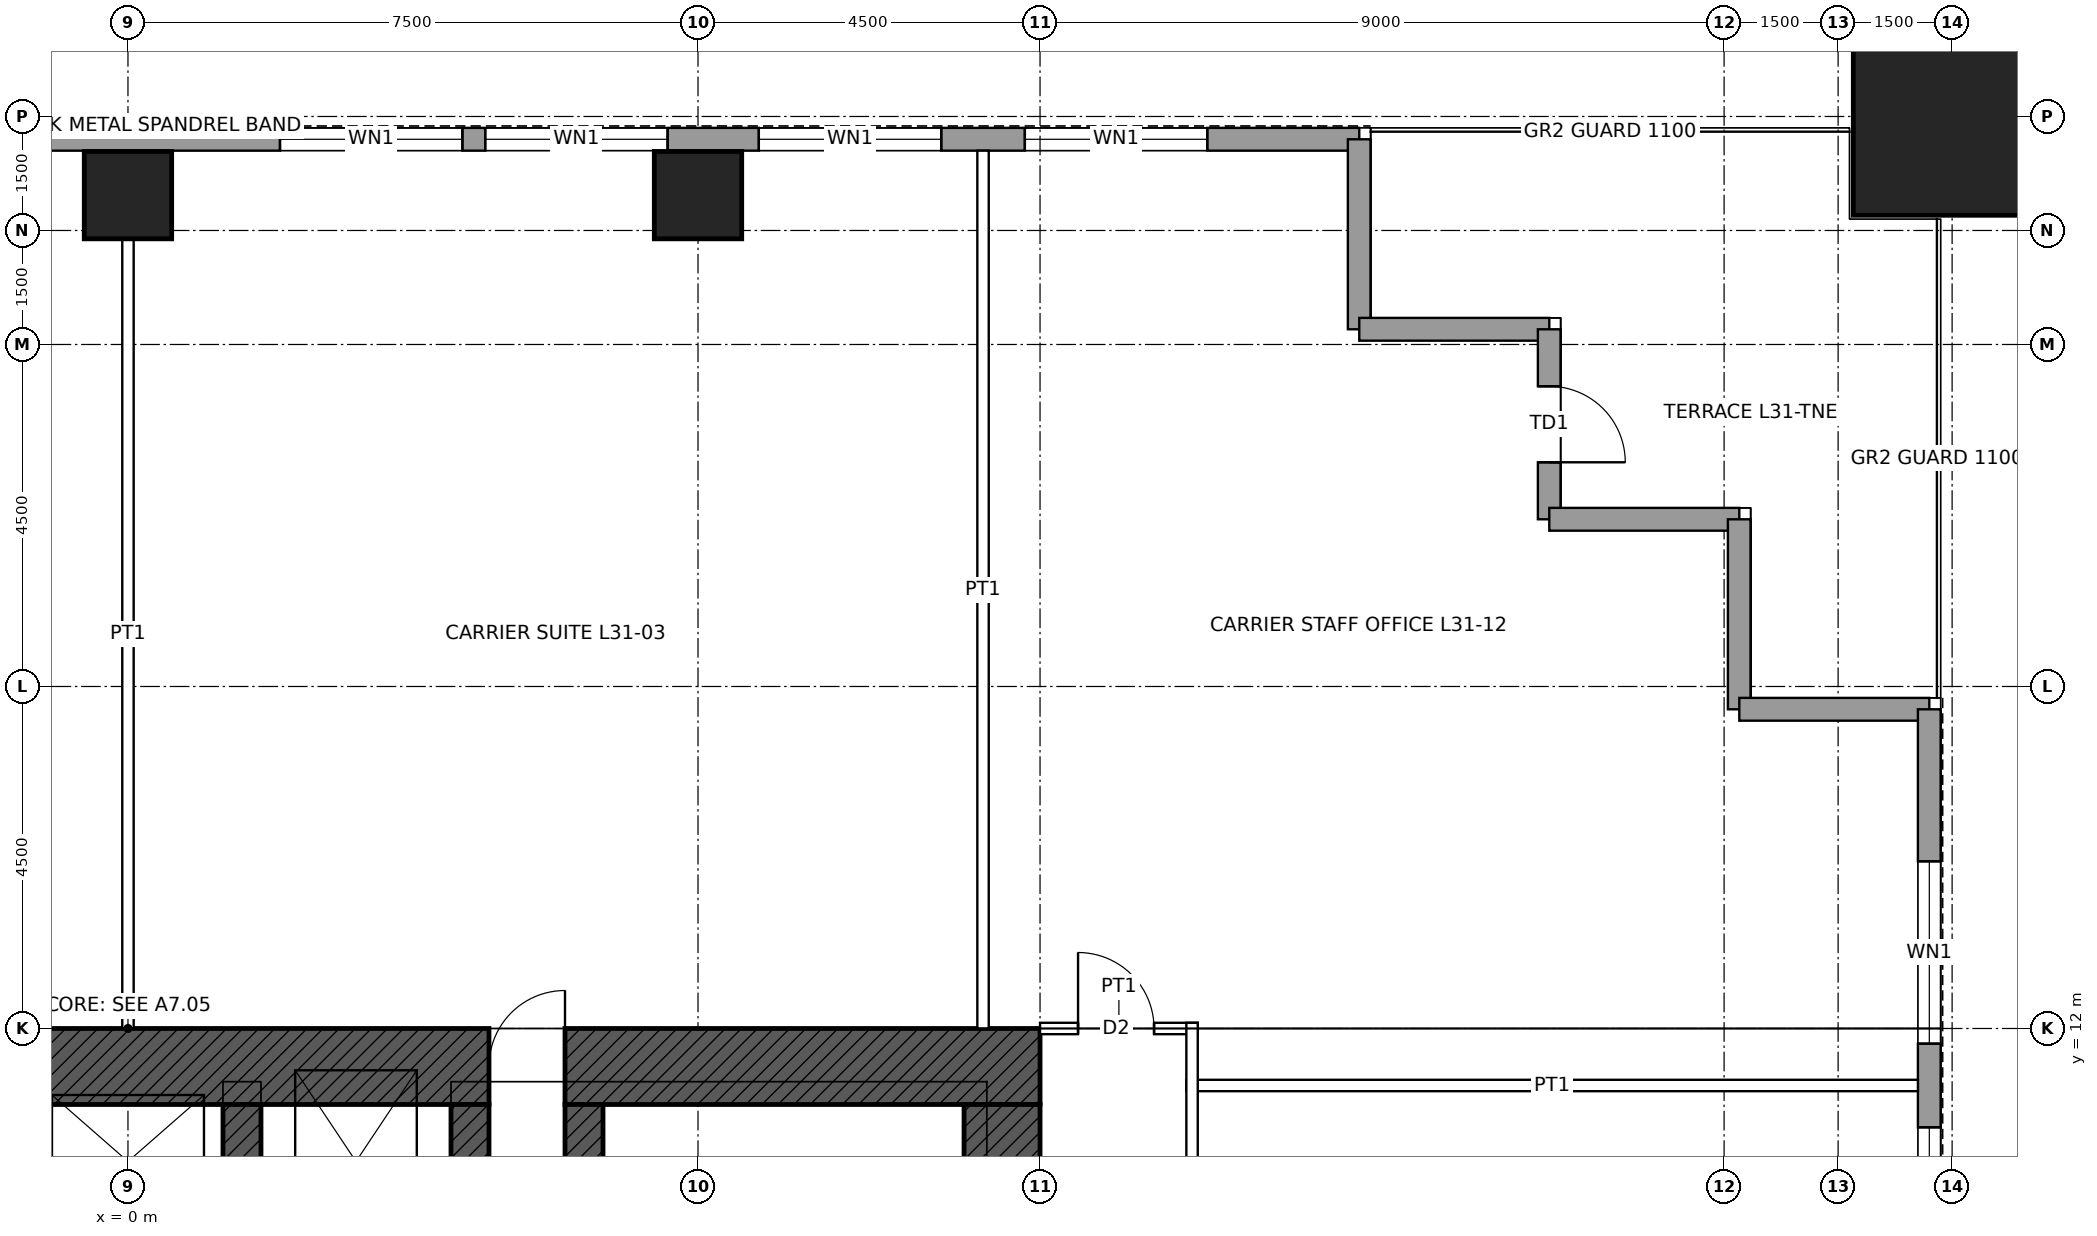
"""IFC4 building model, lengths in metres.
Left out: names, types, materials, properties, quantities, classifications, styles, units other than length and angle.
Written with IfcOpenShell. Run it as: python <this file> out.ifc"""

import sys

from ifc_helpers import new_model, si_unit, direction, frame, frame_2d, origin, origin_2d, place, context, subcontext, project, spatial, rectangle, hollow_rectangle, extrude, element, fill, save


model = new_model("IFC4")
c1 = context("Model", 3, precision=1e-05, world=origin(), true_north=direction((0.0, 1.0)))
c2 = subcontext(c1, "Body", "Model", "MODEL_VIEW")
j1 = project(units=[si_unit("LENGTHUNIT", "METRE"), si_unit("PLANEANGLEUNIT", "RADIAN")], contexts=[c1])
p1 = place(None, origin())
s1 = spatial("IfcSite", under=j1, at=p1, CompositionType="ELEMENT")
p2 = place(p1, origin())
s2 = spatial("IfcBuilding", under=s1, at=p2, CompositionType="ELEMENT")
p3 = place(p2, frame((0.0, 0.0, 153.9)))
s3 = spatial("IfcBuildingStorey", under=s2, at=p3, CompositionType="ELEMENT", Elevation=153.9)
p4 = place(p3, frame((24.0, 24.0, 0.0), z_axis=(0.0, 0.0, 1.0), x_axis=(1.0, 0.0, 0.0)))
e1 = element("IfcColumn", 1, at=p4, inside=s3, PredefinedType="COLUMN", context=c2, shape_type="SweptSolid", body=[
    extrude(hollow_rectangle(XDim=2.6, YDim=2.6, WallThickness=0.13, at=origin_2d()), origin(), (0.0, 0.0, 1.0), 4.5),
])
for number, where, z_axis, x_axis in (
    (2, (0.0, 22.965, 0.0), (0.0, 0.0, 1.0), (1.0, 0.0, 0.0)),
    (3, (7.5, 22.965, 0.0), (0.0, 0.0, 1.0), (1.0, 0.0, 0.0)),
):
    element("IfcColumn", number, at=place(p3, frame(where, z_axis=z_axis, x_axis=x_axis)), inside=s3, PredefinedType="COLUMN", context=c2, shape_type="SweptSolid", body=[
        extrude(hollow_rectangle(XDim=1.15, YDim=1.15, WallThickness=0.075, at=origin_2d()), origin(), (0.0, 0.0, 1.0), 4.5),
    ])
p5 = place(p3, frame((-12.0, 11.5, 0.0), z_axis=(0.0, 0.0, 1.0), x_axis=(1.0, 0.0, 0.0)))
e4 = element("IfcWall", 4, at=p5, inside=s3, PredefinedType="SHEAR", context=c2, shape_type="SweptSolid", body=[
    extrude(rectangle(XDim=24.0, YDim=1.0, at=frame_2d((12.0, 0.0))), origin(), (0.0, 0.0, 1.0), 4.5),
])
p6 = place(p5, frame((6.25, 0.0, 0.0)))
e5 = element("IfcOpeningElement", 5, at=p6, cuts=e4, PredefinedType="OPENING", context=c2, shape_type="SweptSolid", body=[
    extrude(rectangle(XDim=1.0, YDim=2.4, at=frame_2d((0.5, 1.2))), frame((0.0, 0.51, 0.0), z_axis=(0.0, -1.0, 0.0), x_axis=(1.0, 0.0, 0.0)), (0.0, 0.0, 1.0), 1.02),
])
p7 = place(p5, frame((16.75, 0.0, 0.0)))
e6 = element("IfcOpeningElement", 6, at=p7, cuts=e4, PredefinedType="OPENING", context=c2, shape_type="SweptSolid", body=[
    extrude(rectangle(XDim=1.0, YDim=2.4, at=frame_2d((0.5, 1.2))), frame((0.0, 0.51, 0.0), z_axis=(0.0, -1.0, 0.0), x_axis=(1.0, 0.0, 0.0)), (0.0, 0.0, 1.0), 1.02),
])
p8 = place(p3, frame((11.5, 11.0, 0.0), z_axis=(0.0, 0.0, 1.0), x_axis=(0.0, -1.0, 0.0)))
e7 = element("IfcWall", 7, at=p8, inside=s3, PredefinedType="SHEAR", context=c2, shape_type="SweptSolid", body=[
    extrude(rectangle(XDim=22.0, YDim=1.0, at=frame_2d((11.0, 0.0))), origin(), (0.0, 0.0, 1.0), 4.5),
])
p9 = place(p8, frame((10.5, 0.0, 0.0)))
e8 = element("IfcOpeningElement", 8, at=p9, cuts=e7, PredefinedType="OPENING", context=c2, shape_type="SweptSolid", body=[
    extrude(rectangle(XDim=1.0, YDim=2.4, at=frame_2d((0.5, 1.2))), frame((0.0, 0.51, 0.0), z_axis=(0.0, -1.0, 0.0), x_axis=(1.0, 0.0, 0.0)), (0.0, 0.0, 1.0), 1.02),
])
p10 = place(p3, frame((6.0, 4.5, 0.0), z_axis=(0.0, 0.0, 1.0), x_axis=(0.0, 1.0, 0.0)))
e9 = element("IfcWall", 9, at=p10, inside=s3, PredefinedType="SHEAR", context=c2, shape_type="SweptSolid", body=[
    extrude(rectangle(XDim=6.5, YDim=0.5, at=frame_2d((3.25, 0.0))), origin(), (0.0, 0.0, 1.0), 4.5),
])
p11 = place(p10, frame((0.6, 0.0, 0.0)))
e10 = element("IfcOpeningElement", 10, at=p11, cuts=e9, PredefinedType="OPENING", context=c2, shape_type="SweptSolid", body=[
    extrude(rectangle(XDim=1.0, YDim=2.1, at=frame_2d((0.5, 1.05))), frame((0.0, 0.26, 0.0), z_axis=(0.0, -1.0, 0.0), x_axis=(1.0, 0.0, 0.0)), (0.0, 0.0, 1.0), 0.52),
])
for number, where, z_axis, x_axis in (
    (11, (4.5, 8.5, 0.0), (0.0, 0.0, 1.0), (0.0, 1.0, 0.0)),
    (12, (1.5, 8.5, 0.0), (0.0, 0.0, 1.0), (0.0, 1.0, 0.0)),
):
    element("IfcWall", number, at=place(p3, frame(where, z_axis=z_axis, x_axis=x_axis)), inside=s3, PredefinedType="SHEAR", context=c2, shape_type="SweptSolid", body=[
        extrude(rectangle(XDim=2.5, YDim=0.5, at=frame_2d((1.25, 0.0))), origin(), (0.0, 0.0, 1.0), 4.5),
    ])
p12 = place(p3, frame((-16.2, 23.7, 0.0), z_axis=(0.0, 0.0, 1.0), x_axis=(1.0, 0.0, 0.0)))
e13 = element("IfcWall", 13, at=p12, inside=s3, PredefinedType="SOLIDWALL", context=c2, shape_type="SweptSolid", body=[
    extrude(rectangle(XDim=32.4, YDim=0.3, at=frame_2d((16.2, 0.0))), origin(), (0.0, 0.0, 1.0), 4.3),
])
p13 = place(p12, frame((2.0, 0.0, 1.0)))
e14 = element("IfcOpeningElement", 14, at=p13, cuts=e13, PredefinedType="OPENING", context=c2, shape_type="SweptSolid", body=[
    extrude(rectangle(XDim=2.4, YDim=1.2, at=frame_2d((1.2, 0.6))), frame((0.0, 0.16, 0.0), z_axis=(0.0, -1.0, 0.0), x_axis=(1.0, 0.0, 0.0)), (0.0, 0.0, 1.0), 0.32),
])
p14 = place(p12, frame((5.5, 0.0, 1.0)))
e15 = element("IfcOpeningElement", 15, at=p14, cuts=e13, PredefinedType="OPENING", context=c2, shape_type="SweptSolid", body=[
    extrude(rectangle(XDim=2.4, YDim=1.2, at=frame_2d((1.2, 0.6))), frame((0.0, 0.16, 0.0), z_axis=(0.0, -1.0, 0.0), x_axis=(1.0, 0.0, 0.0)), (0.0, 0.0, 1.0), 0.32),
])
p15 = place(p12, frame((9.1, 0.0, 1.0)))
e16 = element("IfcOpeningElement", 16, at=p15, cuts=e13, PredefinedType="OPENING", context=c2, shape_type="SweptSolid", body=[
    extrude(rectangle(XDim=2.4, YDim=1.2, at=frame_2d((1.2, 0.6))), frame((0.0, 0.16, 0.0), z_axis=(0.0, -1.0, 0.0), x_axis=(1.0, 0.0, 0.0)), (0.0, 0.0, 1.0), 0.32),
])
p16 = place(p12, frame((11.8, 0.0, 1.0)))
e17 = element("IfcOpeningElement", 17, at=p16, cuts=e13, PredefinedType="OPENING", context=c2, shape_type="SweptSolid", body=[
    extrude(rectangle(XDim=2.4, YDim=1.2, at=frame_2d((1.2, 0.6))), frame((0.0, 0.16, 0.0), z_axis=(0.0, -1.0, 0.0), x_axis=(1.0, 0.0, 0.0)), (0.0, 0.0, 1.0), 0.32),
])
p17 = place(p12, frame((18.2, 0.0, 1.0)))
e18 = element("IfcOpeningElement", 18, at=p17, cuts=e13, PredefinedType="OPENING", context=c2, shape_type="SweptSolid", body=[
    extrude(rectangle(XDim=2.4, YDim=1.2, at=frame_2d((1.2, 0.6))), frame((0.0, 0.16, 0.0), z_axis=(0.0, -1.0, 0.0), x_axis=(1.0, 0.0, 0.0)), (0.0, 0.0, 1.0), 0.32),
])
p18 = place(p12, frame((20.9, 0.0, 1.0)))
e19 = element("IfcOpeningElement", 19, at=p18, cuts=e13, PredefinedType="OPENING", context=c2, shape_type="SweptSolid", body=[
    extrude(rectangle(XDim=2.4, YDim=1.2, at=frame_2d((1.2, 0.6))), frame((0.0, 0.16, 0.0), z_axis=(0.0, -1.0, 0.0), x_axis=(1.0, 0.0, 0.0)), (0.0, 0.0, 1.0), 0.32),
])
p19 = place(p12, frame((24.5, 0.0, 1.0)))
e20 = element("IfcOpeningElement", 20, at=p19, cuts=e13, PredefinedType="OPENING", context=c2, shape_type="SweptSolid", body=[
    extrude(rectangle(XDim=2.4, YDim=1.2, at=frame_2d((1.2, 0.6))), frame((0.0, 0.16, 0.0), z_axis=(0.0, -1.0, 0.0), x_axis=(1.0, 0.0, 0.0)), (0.0, 0.0, 1.0), 0.32),
])
p20 = place(p12, frame((28.0, 0.0, 1.0)))
e21 = element("IfcOpeningElement", 21, at=p20, cuts=e13, PredefinedType="OPENING", context=c2, shape_type="SweptSolid", body=[
    extrude(rectangle(XDim=2.4, YDim=1.2, at=frame_2d((1.2, 0.6))), frame((0.0, 0.16, 0.0), z_axis=(0.0, -1.0, 0.0), x_axis=(1.0, 0.0, 0.0)), (0.0, 0.0, 1.0), 0.32),
])
for number, where, z_axis, x_axis in (
    (22, (16.2, 23.7, 0.0), (0.0, 0.0, 1.0), (0.0, -1.0, 0.0)),
    (23, (16.2, 21.2, 0.0), (0.0, 0.0, 1.0), (1.0, 0.0, 0.0)),
):
    element("IfcWall", number, at=place(p3, frame(where, z_axis=z_axis, x_axis=x_axis)), inside=s3, PredefinedType="SOLIDWALL", context=c2, shape_type="SweptSolid", body=[
        extrude(rectangle(XDim=2.5, YDim=0.3, at=frame_2d((1.25, 0.0))), origin(), (0.0, 0.0, 1.0), 4.3),
    ])
p21 = place(p3, frame((18.7, 21.2, 0.0), z_axis=(0.0, 0.0, 1.0), x_axis=(0.0, -1.0, 0.0)))
e24 = element("IfcWall", 24, at=p21, inside=s3, PredefinedType="SOLIDWALL", context=c2, shape_type="SweptSolid", body=[
    extrude(rectangle(XDim=2.5, YDim=0.3, at=frame_2d((1.25, 0.0))), origin(), (0.0, 0.0, 1.0), 4.3),
])
p22 = place(p21, frame((0.75, 0.0, 0.0)))
e25 = element("IfcOpeningElement", 25, at=p22, cuts=e24, PredefinedType="OPENING", context=c2, shape_type="SweptSolid", body=[
    extrude(rectangle(XDim=1.0, YDim=2.4, at=frame_2d((0.5, 1.2))), frame((0.0, 0.16, 0.0), z_axis=(0.0, -1.0, 0.0), x_axis=(1.0, 0.0, 0.0)), (0.0, 0.0, 1.0), 0.32),
])
for number, where, z_axis, x_axis in (
    (26, (18.7, 18.7, 0.0), (0.0, 0.0, 1.0), (1.0, 0.0, 0.0)),
    (27, (21.2, 18.7, 0.0), (0.0, 0.0, 1.0), (0.0, -1.0, 0.0)),
    (28, (21.2, 16.2, 0.0), (0.0, 0.0, 1.0), (1.0, 0.0, 0.0)),
):
    element("IfcWall", number, at=place(p3, frame(where, z_axis=z_axis, x_axis=x_axis)), inside=s3, PredefinedType="SOLIDWALL", context=c2, shape_type="SweptSolid", body=[
        extrude(rectangle(XDim=2.5, YDim=0.3, at=frame_2d((1.25, 0.0))), origin(), (0.0, 0.0, 1.0), 4.3),
    ])
p23 = place(p3, frame((23.7, 16.2, 0.0), z_axis=(0.0, 0.0, 1.0), x_axis=(0.0, -1.0, 0.0)))
e29 = element("IfcWall", 29, at=p23, inside=s3, PredefinedType="SOLIDWALL", context=c2, shape_type="SweptSolid", body=[
    extrude(rectangle(XDim=32.4, YDim=0.3, at=frame_2d((16.2, 0.0))), origin(), (0.0, 0.0, 1.0), 4.3),
])
p24 = place(p23, frame((2.0, 0.0, 1.0)))
e30 = element("IfcOpeningElement", 30, at=p24, cuts=e29, PredefinedType="OPENING", context=c2, shape_type="SweptSolid", body=[
    extrude(rectangle(XDim=2.4, YDim=1.2, at=frame_2d((1.2, 0.6))), frame((0.0, 0.16, 0.0), z_axis=(0.0, -1.0, 0.0), x_axis=(1.0, 0.0, 0.0)), (0.0, 0.0, 1.0), 0.32),
])
p25 = place(p23, frame((5.5, 0.0, 1.0)))
e31 = element("IfcOpeningElement", 31, at=p25, cuts=e29, PredefinedType="OPENING", context=c2, shape_type="SweptSolid", body=[
    extrude(rectangle(XDim=2.4, YDim=1.2, at=frame_2d((1.2, 0.6))), frame((0.0, 0.16, 0.0), z_axis=(0.0, -1.0, 0.0), x_axis=(1.0, 0.0, 0.0)), (0.0, 0.0, 1.0), 0.32),
])
p26 = place(p23, frame((9.1, 0.0, 1.0)))
e32 = element("IfcOpeningElement", 32, at=p26, cuts=e29, PredefinedType="OPENING", context=c2, shape_type="SweptSolid", body=[
    extrude(rectangle(XDim=2.4, YDim=1.2, at=frame_2d((1.2, 0.6))), frame((0.0, 0.16, 0.0), z_axis=(0.0, -1.0, 0.0), x_axis=(1.0, 0.0, 0.0)), (0.0, 0.0, 1.0), 0.32),
])
p27 = place(p23, frame((11.8, 0.0, 1.0)))
e33 = element("IfcOpeningElement", 33, at=p27, cuts=e29, PredefinedType="OPENING", context=c2, shape_type="SweptSolid", body=[
    extrude(rectangle(XDim=2.4, YDim=1.2, at=frame_2d((1.2, 0.6))), frame((0.0, 0.16, 0.0), z_axis=(0.0, -1.0, 0.0), x_axis=(1.0, 0.0, 0.0)), (0.0, 0.0, 1.0), 0.32),
])
p28 = place(p23, frame((18.2, 0.0, 1.0)))
e34 = element("IfcOpeningElement", 34, at=p28, cuts=e29, PredefinedType="OPENING", context=c2, shape_type="SweptSolid", body=[
    extrude(rectangle(XDim=2.4, YDim=1.2, at=frame_2d((1.2, 0.6))), frame((0.0, 0.16, 0.0), z_axis=(0.0, -1.0, 0.0), x_axis=(1.0, 0.0, 0.0)), (0.0, 0.0, 1.0), 0.32),
])
p29 = place(p23, frame((20.9, 0.0, 1.0)))
e35 = element("IfcOpeningElement", 35, at=p29, cuts=e29, PredefinedType="OPENING", context=c2, shape_type="SweptSolid", body=[
    extrude(rectangle(XDim=2.4, YDim=1.2, at=frame_2d((1.2, 0.6))), frame((0.0, 0.16, 0.0), z_axis=(0.0, -1.0, 0.0), x_axis=(1.0, 0.0, 0.0)), (0.0, 0.0, 1.0), 0.32),
])
p30 = place(p23, frame((24.5, 0.0, 1.0)))
e36 = element("IfcOpeningElement", 36, at=p30, cuts=e29, PredefinedType="OPENING", context=c2, shape_type="SweptSolid", body=[
    extrude(rectangle(XDim=2.4, YDim=1.2, at=frame_2d((1.2, 0.6))), frame((0.0, 0.16, 0.0), z_axis=(0.0, -1.0, 0.0), x_axis=(1.0, 0.0, 0.0)), (0.0, 0.0, 1.0), 0.32),
])
p31 = place(p23, frame((28.0, 0.0, 1.0)))
e37 = element("IfcOpeningElement", 37, at=p31, cuts=e29, PredefinedType="OPENING", context=c2, shape_type="SweptSolid", body=[
    extrude(rectangle(XDim=2.4, YDim=1.2, at=frame_2d((1.2, 0.6))), frame((0.0, 0.16, 0.0), z_axis=(0.0, -1.0, 0.0), x_axis=(1.0, 0.0, 0.0)), (0.0, 0.0, 1.0), 0.32),
])
p32 = place(p3, frame((13.925, 11.25, 0.0), z_axis=(0.0, 0.0, 1.0), x_axis=(1.0, 0.0, 0.0)))
e38 = element("IfcWall", 38, at=p32, inside=s3, PredefinedType="PARTITIONING", context=c2, shape_type="SweptSolid", body=[
    extrude(rectangle(XDim=9.625, YDim=0.15, at=frame_2d((4.812, 0.0))), origin(), (0.0, 0.0, 1.0), 3.431),
])
p33 = place(p3, frame((12.0, 12.0, 0.0), z_axis=(0.0, 0.0, 1.0), x_axis=(1.0, 0.0, 0.0)))
e39 = element("IfcWall", 39, at=p33, inside=s3, PredefinedType="PARTITIONING", context=c2, shape_type="SweptSolid", body=[
    extrude(rectangle(XDim=2.075, YDim=0.15, at=frame_2d((1.038, 0.0))), origin(), (0.0, 0.0, 1.0), 3.284),
])
p34 = place(p33, frame((0.5, 0.0, 0.0)))
e40 = element("IfcOpeningElement", 40, at=p34, cuts=e39, PredefinedType="OPENING", context=c2, shape_type="SweptSolid", body=[
    extrude(rectangle(XDim=1.0, YDim=2.1, at=frame_2d((0.5, 1.05))), frame((0.0, 0.085, 0.0), z_axis=(0.0, -1.0, 0.0), x_axis=(1.0, 0.0, 0.0)), (0.0, 0.0, 1.0), 0.17),
])
p35 = place(p3, frame((0.0, 12.0, 0.0), z_axis=(0.0, 0.0, 1.0), x_axis=(0.0, 1.0, 0.0)))
e41 = element("IfcWall", 41, at=p35, inside=s3, PredefinedType="PARTITIONING", context=c2, shape_type="SweptSolid", body=[
    extrude(rectangle(XDim=10.39, YDim=0.15, at=frame_2d((5.195, 0.0))), origin(), (0.0, 0.0, 1.0), 3.431),
])
p36 = place(p3, frame((11.25, 12.0, 0.0), z_axis=(0.0, 0.0, 1.0), x_axis=(0.0, 1.0, 0.0)))
e42 = element("IfcWall", 42, at=p36, inside=s3, PredefinedType="PARTITIONING", context=c2, shape_type="SweptSolid", body=[
    extrude(rectangle(XDim=11.55, YDim=0.15, at=frame_2d((5.775, 0.0))), origin(), (0.0, 0.0, 1.0), 3.431),
])
p37 = place(p3, frame((14.0, -14.075, 0.0), z_axis=(0.0, 0.0, 1.0), x_axis=(0.0, 1.0, 0.0)))
e43 = element("IfcWall", 43, at=p37, inside=s3, PredefinedType="PARTITIONING", context=c2, shape_type="SweptSolid", body=[
    extrude(rectangle(XDim=26.15, YDim=0.15, at=frame_2d((13.075, 0.0))), origin(), (0.0, 0.0, 1.0), 4.3),
])
p38 = place(p37, frame((18.8, 0.0, 0.0)))
e44 = element("IfcOpeningElement", 44, at=p38, cuts=e43, PredefinedType="OPENING", context=c2, shape_type="SweptSolid", body=[
    extrude(rectangle(XDim=1.8, YDim=2.4, at=frame_2d((0.9, 1.2))), frame((0.0, 0.085, 0.0), z_axis=(0.0, -1.0, 0.0), x_axis=(1.0, 0.0, 0.0)), (0.0, 0.0, 1.0), 0.17),
])
p39 = place(p37, frame((7.55, 0.0, 0.0)))
e45 = element("IfcOpeningElement", 45, at=p39, cuts=e43, PredefinedType="OPENING", context=c2, shape_type="SweptSolid", body=[
    extrude(rectangle(XDim=1.8, YDim=2.4, at=frame_2d((0.9, 1.2))), frame((0.0, 0.085, 0.0), z_axis=(0.0, -1.0, 0.0), x_axis=(1.0, 0.0, 0.0)), (0.0, 0.0, 1.0), 0.17),
])
p40 = place(p17, origin())
e46 = element("IfcWindow", 46, at=p40, inside=s3, PartitioningType="SINGLE_PANEL", PredefinedType="WINDOW", context=c2, shape_type="SweptSolid", body=[
    extrude(rectangle(XDim=2.4, YDim=1.2, at=frame_2d((1.2, 0.6))), frame((0.0, 0.03, 0.0), z_axis=(0.0, -1.0, 0.0), x_axis=(1.0, 0.0, 0.0)), (0.0, 0.0, 1.0), 0.06),
])
fill(e18, e46)
p41 = place(p18, origin())
e47 = element("IfcWindow", 47, at=p41, inside=s3, PartitioningType="SINGLE_PANEL", PredefinedType="WINDOW", context=c2, shape_type="SweptSolid", body=[
    extrude(rectangle(XDim=2.4, YDim=1.2, at=frame_2d((1.2, 0.6))), frame((0.0, 0.03, 0.0), z_axis=(0.0, -1.0, 0.0), x_axis=(1.0, 0.0, 0.0)), (0.0, 0.0, 1.0), 0.06),
])
fill(e19, e47)
p42 = place(p19, origin())
e48 = element("IfcWindow", 48, at=p42, inside=s3, PartitioningType="SINGLE_PANEL", PredefinedType="WINDOW", context=c2, shape_type="SweptSolid", body=[
    extrude(rectangle(XDim=2.4, YDim=1.2, at=frame_2d((1.2, 0.6))), frame((0.0, 0.03, 0.0), z_axis=(0.0, -1.0, 0.0), x_axis=(1.0, 0.0, 0.0)), (0.0, 0.0, 1.0), 0.06),
])
fill(e20, e48)
p43 = place(p20, origin())
e49 = element("IfcWindow", 49, at=p43, inside=s3, PartitioningType="SINGLE_PANEL", PredefinedType="WINDOW", context=c2, shape_type="SweptSolid", body=[
    extrude(rectangle(XDim=2.4, YDim=1.2, at=frame_2d((1.2, 0.6))), frame((0.0, 0.03, 0.0), z_axis=(0.0, -1.0, 0.0), x_axis=(1.0, 0.0, 0.0)), (0.0, 0.0, 1.0), 0.06),
])
fill(e21, e49)
p44 = place(p22, origin())
e50 = element("IfcDoor", 50, at=p44, inside=s3, OperationType="SINGLE_SWING_RIGHT", PredefinedType="DOOR", context=c2, shape_type="SweptSolid", body=[
    extrude(rectangle(XDim=1.0, YDim=2.4, at=frame_2d((0.5, 1.2))), frame((0.0, 0.025, 0.0), z_axis=(0.0, -1.0, 0.0), x_axis=(1.0, 0.0, 0.0)), (0.0, 0.0, 1.0), 0.05),
])
fill(e25, e50)
p45 = place(p24, origin())
e51 = element("IfcWindow", 51, at=p45, inside=s3, PartitioningType="SINGLE_PANEL", PredefinedType="WINDOW", context=c2, shape_type="SweptSolid", body=[
    extrude(rectangle(XDim=2.4, YDim=1.2, at=frame_2d((1.2, 0.6))), frame((0.0, 0.03, 0.0), z_axis=(0.0, -1.0, 0.0), x_axis=(1.0, 0.0, 0.0)), (0.0, 0.0, 1.0), 0.06),
])
fill(e30, e51)
p46 = place(p25, origin())
e52 = element("IfcWindow", 52, at=p46, inside=s3, PartitioningType="SINGLE_PANEL", PredefinedType="WINDOW", context=c2, shape_type="SweptSolid", body=[
    extrude(rectangle(XDim=2.4, YDim=1.2, at=frame_2d((1.2, 0.6))), frame((0.0, 0.03, 0.0), z_axis=(0.0, -1.0, 0.0), x_axis=(1.0, 0.0, 0.0)), (0.0, 0.0, 1.0), 0.06),
])
fill(e31, e52)
p47 = place(p7, origin())
e53 = element("IfcDoor", 53, at=p47, inside=s3, OperationType="SINGLE_SWING_RIGHT", PredefinedType="DOOR", context=c2, shape_type="SweptSolid", body=[
    extrude(rectangle(XDim=1.0, YDim=2.4, at=frame_2d((0.5, 1.2))), frame((0.0, 0.485, 0.0), z_axis=(0.0, -1.0, 0.0), x_axis=(1.0, 0.0, 0.0)), (0.0, 0.0, 1.0), 0.05),
])
fill(e6, e53)
p48 = place(p34, origin())
e54 = element("IfcDoor", 54, at=p48, inside=s3, OperationType="SINGLE_SWING_LEFT", PredefinedType="DOOR", context=c2, shape_type="SweptSolid", body=[
    extrude(rectangle(XDim=1.0, YDim=2.1, at=frame_2d((0.5, 1.05))), frame((0.0, 0.025, 0.0), z_axis=(0.0, -1.0, 0.0), x_axis=(1.0, 0.0, 0.0)), (0.0, 0.0, 1.0), 0.05),
])
fill(e40, e54)
save(model, sys.argv[1])
